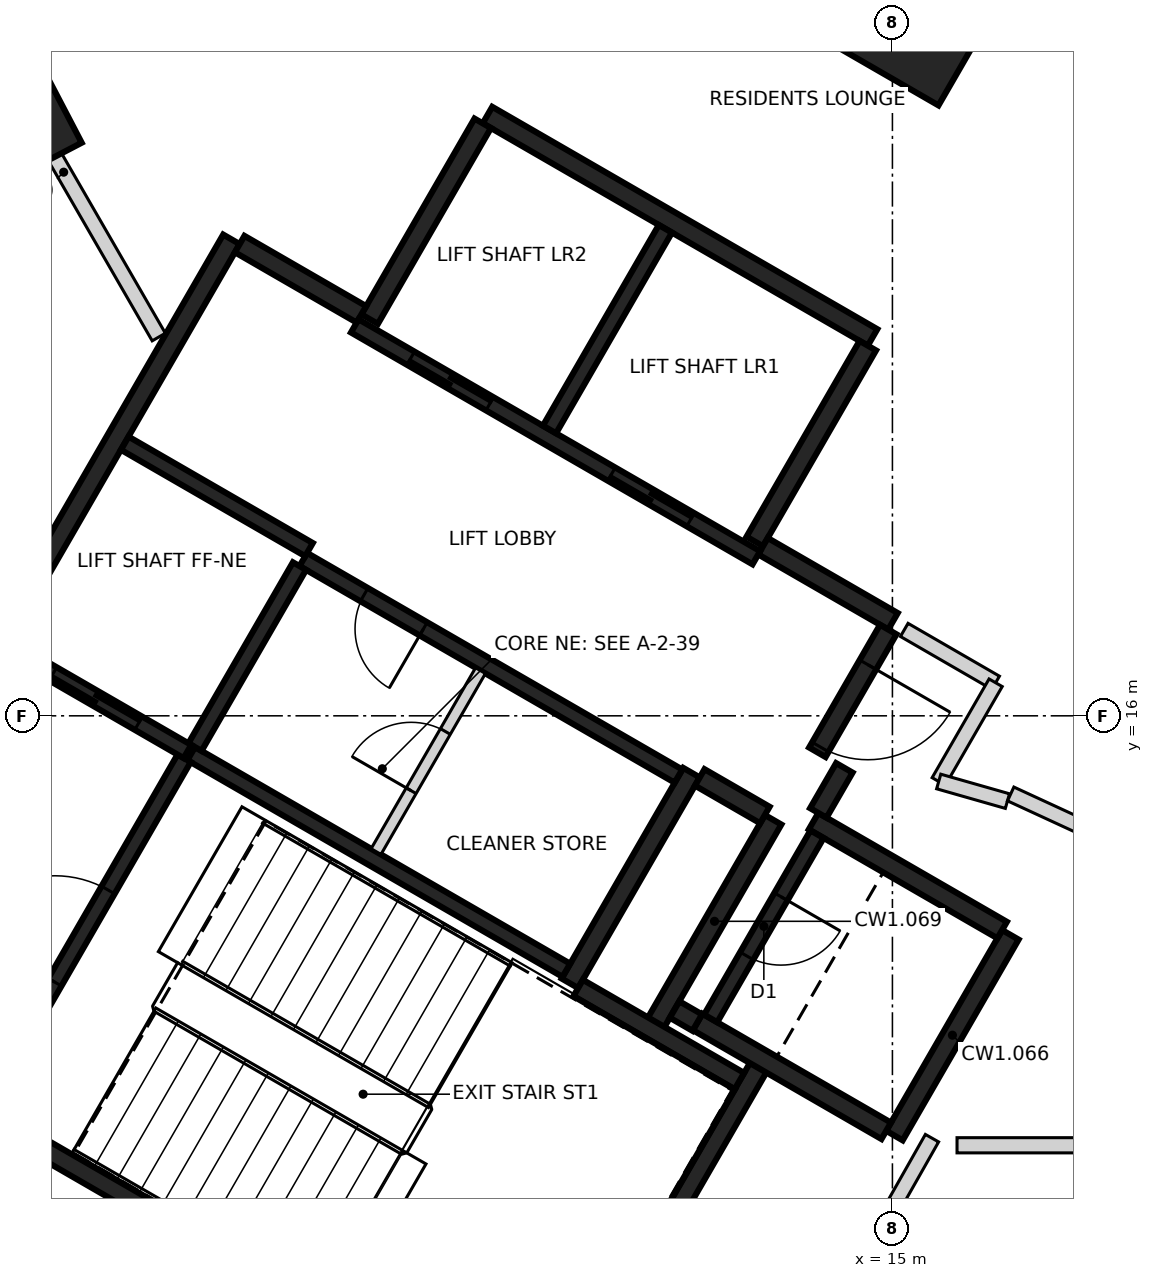
"""IFC4 building model, lengths in metres.
Left out: names, types, materials, properties, quantities, classifications, styles, units other than length and angle.
Written with IfcOpenShell. Run it as: python <this file> out.ifc"""

import sys

from ifc_helpers import new_model, si_unit, direction, frame, frame_2d, origin, origin_2d, place, context, subcontext, project, spatial, rectangle, extrude, element, fill, save


model = new_model("IFC4")
c1 = context("Model", 3, precision=1e-05, world=origin(), true_north=direction((0.0, 1.0)))
c2 = subcontext(c1, "Body", "Model", "MODEL_VIEW")
j1 = project(units=[si_unit("LENGTHUNIT", "METRE"), si_unit("PLANEANGLEUNIT", "RADIAN")], contexts=[c1])
p1 = place(None, origin())
s1 = spatial("IfcSite", under=j1, at=p1, CompositionType="ELEMENT")
p2 = place(p1, origin())
s2 = spatial("IfcBuilding", under=s1, at=p2, CompositionType="ELEMENT")
p3 = place(p2, frame((0.0, 0.0, 128.8)))
s3 = spatial("IfcBuildingStorey", under=s2, at=p3, CompositionType="ELEMENT", Elevation=128.8)
p4 = place(p3, frame((3.667, 23.896, -0.4), z_axis=(0.0, 0.0, 1.0), x_axis=(-0.463006774365, 0.886354740999, 0.0)))
e1 = element("IfcColumn", 1, at=p4, inside=s3, PredefinedType="COLUMN", context=c2, shape_type="SweptSolid", body=[
    extrude(rectangle(XDim=1.25, YDim=0.85, at=origin_2d()), origin(), (0.0, 0.0, 1.0), 3.6),
])
p5 = place(p3, frame((15.207, 26.34, -0.4), z_axis=(0.0, 0.0, 1.0), x_axis=(0.5, 0.866025403784, 0.0)))
e2 = element("IfcColumn", 2, at=p5, inside=s3, PredefinedType="COLUMN", context=c2, shape_type="SweptSolid", body=[
    extrude(rectangle(XDim=3.6, YDim=3.0, at=origin_2d()), origin(), (0.0, 0.0, 1.0), 3.6),
])
p6 = place(p3, frame((10.42, 6.498, 0.0), z_axis=(0.0, 0.0, 1.0), x_axis=(-0.866021906294, 0.500006057782, 0.0)))
e3 = element("IfcWall", 3, at=p6, inside=s3, PredefinedType="SHEAR", context=c2, shape_type="SweptSolid", body=[
    extrude(rectangle(XDim=11.55, YDim=0.25, at=frame_2d((5.775, 0.0))), origin(), (0.0, 0.0, 1.0), 3.2),
])
p7 = place(p6, frame((10.025, 0.0, 0.0)))
e4 = element("IfcOpeningElement", 4, at=p7, cuts=e3, PredefinedType="OPENING", context=c2, shape_type="SweptSolid", body=[
    extrude(rectangle(XDim=1.2, YDim=2.1, at=frame_2d((0.6, 1.05))), frame((0.0, 0.135, 0.0), z_axis=(0.0, -1.0, 0.0), x_axis=(1.0, 0.0, 0.0)), (0.0, 0.0, 1.0), 0.27),
])
p8 = place(p6, frame((8.725, 0.0, 0.0)))
e5 = element("IfcOpeningElement", 5, at=p8, cuts=e3, PredefinedType="OPENING", context=c2, shape_type="SweptSolid", body=[
    extrude(rectangle(XDim=1.2, YDim=2.1, at=frame_2d((0.6, 1.05))), frame((0.0, 0.135, 0.0), z_axis=(0.0, -1.0, 0.0), x_axis=(1.0, 0.0, 0.0)), (0.0, 0.0, 1.0), 0.27),
])
p9 = place(p3, frame((3.179, 16.856, 0.0), z_axis=(0.0, 0.0, 1.0), x_axis=(0.500004234368, 0.866022959057, 0.0)))
e6 = element("IfcWall", 6, at=p9, inside=s3, PredefinedType="SHEAR", context=c2, shape_type="SweptSolid", body=[
    extrude(rectangle(XDim=6.25, YDim=0.25, at=frame_2d((3.125, 0.0))), origin(), (0.0, 0.0, 1.0), 3.2),
])
p10 = place(p3, frame((9.673, 23.903, 0.0), z_axis=(0.0, 0.0, 1.0), x_axis=(0.86603616409, -0.499981362141, 0.0)))
e7 = element("IfcWall", 7, at=p10, inside=s3, PredefinedType="SHEAR", context=c2, shape_type="SweptSolid", body=[
    extrude(rectangle(XDim=5.85, YDim=0.25, at=frame_2d((2.925, 0.0))), origin(), (0.0, 0.0, 1.0), 3.2),
])
p11 = place(p3, frame((13.238, 11.378, 0.0), z_axis=(0.0, 0.0, 1.0), x_axis=(-0.500008851346, -0.866020293397, 0.0)))
e8 = element("IfcWall", 8, at=p11, inside=s3, PredefinedType="SHEAR", context=c2, shape_type="SweptSolid", body=[
    extrude(rectangle(XDim=5.51, YDim=0.25, at=frame_2d((2.755, 0.0))), origin(), (0.0, 0.0, 1.0), 3.2),
])
p12 = place(p3, frame((12.357, 15.252, 0.0), z_axis=(0.0, 0.0, 1.0), x_axis=(-0.500028443584, -0.866008981251, 0.0)))
e9 = element("IfcWall", 9, at=p12, inside=s3, PredefinedType="SHEAR", context=c2, shape_type="SweptSolid", body=[
    extrude(rectangle(XDim=3.2, YDim=0.25, at=frame_2d((1.6, 0.0))), origin(), (0.0, 0.0, 1.0), 3.2),
])
for number, where, z_axis, x_axis in (
    (10, (8.123, 21.219, 0.0), (0.0, 0.0, 1.0), (0.5, 0.866, 0.0)),
    (11, (14.676, 20.87, 0.0), (0.0, 0.0, 1.0), (-0.5, -0.866, 0.0)),
):
    element("IfcWall", number, at=place(p3, frame(where, z_axis=z_axis, x_axis=x_axis)), inside=s3, PredefinedType="SHEAR", context=c2, shape_type="SweptSolid", body=[
        extrude(rectangle(XDim=2.975, YDim=0.25, at=frame_2d((1.487, 0.0))), origin(), (0.0, 0.0, 1.0), 3.2),
    ])
p13 = place(p3, frame((16.552, 13.119, 0.0), z_axis=(0.0, 0.0, 1.0), x_axis=(-0.499978833458, -0.866037623948, 0.0)))
e12 = element("IfcWall", 12, at=p13, inside=s3, PredefinedType="SHEAR", context=c2, shape_type="SweptSolid", body=[
    extrude(rectangle(XDim=3.05, YDim=0.25, at=frame_2d((1.525, 0.0))), origin(), (0.0, 0.0, 1.0), 3.2),
])
p14 = place(p3, frame((14.918, 10.54, 0.0), z_axis=(0.0, 0.0, 1.0), x_axis=(-0.866063538972, 0.499933942099, 0.0)))
e13 = element("IfcWall", 13, at=p14, inside=s3, PredefinedType="SHEAR", context=c2, shape_type="SweptSolid", body=[
    extrude(rectangle(XDim=2.865, YDim=0.25, at=frame_2d((1.432, 0.0))), origin(), (0.0, 0.0, 1.0), 3.2),
])
p15 = place(p3, frame((13.963, 14.614, 0.0), z_axis=(0.0, 0.0, 1.0), x_axis=(0.866042235819, -0.499970844928, 0.0)))
e14 = element("IfcWall", 14, at=p15, inside=s3, PredefinedType="SHEAR", context=c2, shape_type="SweptSolid", body=[
    extrude(rectangle(XDim=2.865, YDim=0.25, at=frame_2d((1.432, 0.0))), origin(), (0.0, 0.0, 1.0), 3.2),
])
p16 = place(p3, frame((11.888, 11.961, 0.0), z_axis=(0.0, 0.0, 1.0), x_axis=(0.500003324108, 0.866023484601, 0.0)))
e15 = element("IfcWall", 15, at=p16, inside=s3, PredefinedType="SHEAR", context=c2, shape_type="SweptSolid", body=[
    extrude(rectangle(XDim=3.085, YDim=0.25, at=frame_2d((1.542, 0.0))), origin(), (0.0, 0.0, 1.0), 3.2),
])
p17 = place(p3, frame((10.865, 12.418, 0.0), z_axis=(0.0, 0.0, 1.0), x_axis=(0.866026229868, -0.499998569178, 0.0)))
e16 = element("IfcWall", 16, at=p17, inside=s3, PredefinedType="SHEAR", context=c2, shape_type="SweptSolid", body=[
    extrude(rectangle(XDim=2.449, YDim=0.25, at=frame_2d((1.225, 0.0))), origin(), (0.0, 0.0, 1.0), 3.2),
])
p18 = place(p3, frame((13.297, 18.231, 0.0), z_axis=(0.0, 0.0, 1.0), x_axis=(0.866043531843, -0.499968599967, 0.0)))
e17 = element("IfcWall", 17, at=p18, inside=s3, PredefinedType="SHEAR", context=c2, shape_type="SweptSolid", body=[
    extrude(rectangle(XDim=1.975, YDim=0.25, at=frame_2d((0.987, 0.0))), origin(), (0.0, 0.0, 1.0), 3.2),
])
p19 = place(p3, frame((6.413, 22.206, 0.0), z_axis=(0.0, 0.0, 1.0), x_axis=(0.866016279763, -0.500015802937, 0.0)))
e18 = element("IfcWall", 18, at=p19, inside=s3, PredefinedType="SHEAR", context=c2, shape_type="SweptSolid", body=[
    extrude(rectangle(XDim=1.849, YDim=0.25, at=frame_2d((0.925, 0.0))), origin(), (0.0, 0.0, 1.0), 3.2),
])
p20 = place(p3, frame((14.945, 17.135, 0.0), z_axis=(0.0, 0.0, 1.0), x_axis=(-0.499983108224, -0.866035156036, 0.0)))
e19 = element("IfcWall", 19, at=p20, inside=s3, PredefinedType="SHEAR", context=c2, shape_type="SweptSolid", body=[
    extrude(rectangle(XDim=1.865, YDim=0.25, at=frame_2d((0.932, 0.0))), origin(), (0.0, 0.0, 1.0), 3.2),
])
p21 = place(p20, frame((0.535, 0.0, 0.0)))
e20 = element("IfcOpeningElement", 20, at=p21, cuts=e19, PredefinedType="OPENING", context=c2, shape_type="SweptSolid", body=[
    extrude(rectangle(XDim=1.25, YDim=2.1, at=frame_2d((0.625, 1.05))), frame((0.0, 0.135, 0.0), z_axis=(0.0, -1.0, 0.0), x_axis=(1.0, 0.0, 0.0)), (0.0, 0.0, 1.0), 0.27),
])
p22 = place(p3, frame((13.322, 14.695, 0.0), z_axis=(0.0, 0.0, 1.0), x_axis=(-0.866017078145, 0.500014420154, 0.0)))
e21 = element("IfcWall", 21, at=p22, inside=s3, PredefinedType="SHEAR", context=c2, shape_type="SweptSolid", body=[
    extrude(rectangle(XDim=0.989, YDim=0.25, at=frame_2d((0.495, 0.0))), origin(), (0.0, 0.0, 1.0), 3.2),
])
p23 = place(p3, frame((14.368, 15.315, 0.0), z_axis=(0.0, 0.0, 1.0), x_axis=(-0.499897359611, -0.866084655132, 0.0)))
e22 = element("IfcWall", 22, at=p23, inside=s3, PredefinedType="SHEAR", context=c2, shape_type="SweptSolid", body=[
    extrude(rectangle(XDim=0.685, YDim=0.25, at=frame_2d((0.342, 0.0))), origin(), (0.0, 0.0, 1.0), 3.2),
])
p24 = place(p3, frame((12.433, 11.964, 0.0), z_axis=(0.0, 0.0, 1.0), x_axis=(-0.866055875208, 0.499947218231, 0.0)))
e23 = element("IfcWall", 23, at=p24, inside=s3, PredefinedType="SHEAR", context=c2, shape_type="SweptSolid", body=[
    extrude(rectangle(XDim=0.345, YDim=0.25, at=frame_2d((0.172, 0.0))), origin(), (0.0, 0.0, 1.0), 3.2),
])
p25 = place(p3, frame((13.21, 18.08, 0.0), z_axis=(0.0, 0.0, 1.0), x_axis=(-0.866030299012, 0.499991521122, 0.0)))
e24 = element("IfcWall", 24, at=p25, inside=s3, PredefinedType="SHEAR", context=c2, shape_type="SweptSolid", body=[
    extrude(rectangle(XDim=6.1, YDim=0.2, at=frame_2d((3.05, 0.0))), origin(), (0.0, 0.0, 1.0), 3.2),
])
p26 = place(p25, frame((1.0, 0.0, 0.0)))
e25 = element("IfcOpeningElement", 25, at=p26, cuts=e24, PredefinedType="OPENING", context=c2, shape_type="SweptSolid", body=[
    extrude(rectangle(XDim=1.2, YDim=2.1, at=frame_2d((0.6, 1.05))), frame((0.0, 0.11, 0.0), z_axis=(0.0, -1.0, 0.0), x_axis=(1.0, 0.0, 0.0)), (0.0, 0.0, 1.0), 0.22),
])
p27 = place(p25, frame((4.05, 0.0, 0.0)))
e26 = element("IfcOpeningElement", 26, at=p27, cuts=e24, PredefinedType="OPENING", context=c2, shape_type="SweptSolid", body=[
    extrude(rectangle(XDim=1.2, YDim=2.1, at=frame_2d((0.6, 1.05))), frame((0.0, 0.11, 0.0), z_axis=(0.0, -1.0, 0.0), x_axis=(1.0, 0.0, 0.0)), (0.0, 0.0, 1.0), 0.22),
])
p28 = place(p3, frame((5.775, 15.502, 0.0), z_axis=(0.0, 0.0, 1.0), x_axis=(0.866020080793, -0.500009219579, 0.0)))
e27 = element("IfcWall", 27, at=p28, inside=s3, PredefinedType="SHEAR", context=c2, shape_type="SweptSolid", body=[
    extrude(rectangle(XDim=5.699, YDim=0.2, at=frame_2d((2.85, 0.0))), origin(), (0.0, 0.0, 1.0), 3.2),
])
p29 = place(p3, frame((12.185, 15.207, 0.0), z_axis=(0.0, 0.0, 1.0), x_axis=(-0.866020080793, 0.500009219579, 0.0)))
e28 = element("IfcWall", 28, at=p29, inside=s3, PredefinedType="SHEAR", context=c2, shape_type="SweptSolid", body=[
    extrude(rectangle(XDim=5.699, YDim=0.2, at=frame_2d((2.85, 0.0))), origin(), (0.0, 0.0, 1.0), 3.2),
])
p30 = place(p29, frame((3.874, 0.0, 0.0)))
e29 = element("IfcOpeningElement", 29, at=p30, cuts=e28, PredefinedType="OPENING", context=c2, shape_type="SweptSolid", body=[
    extrude(rectangle(XDim=0.9, YDim=2.1, at=frame_2d((0.45, 1.05))), frame((0.0, 0.11, 0.0), z_axis=(0.0, -1.0, 0.0), x_axis=(1.0, 0.0, 0.0)), (0.0, 0.0, 1.0), 0.22),
])
p31 = place(p3, frame((3.057, 10.895, 0.0), z_axis=(0.0, 0.0, 1.0), x_axis=(0.499989418164, 0.866031513124, 0.0)))
e30 = element("IfcWall", 30, at=p31, inside=s3, PredefinedType="SHEAR", context=c2, shape_type="SweptSolid", body=[
    extrude(rectangle(XDim=5.251, YDim=0.2, at=frame_2d((2.625, 0.0))), origin(), (0.0, 0.0, 1.0), 3.2),
])
p32 = place(p31, frame((1.849, 0.0, 0.0)))
e31 = element("IfcOpeningElement", 31, at=p32, cuts=e30, PredefinedType="OPENING", context=c2, shape_type="SweptSolid", body=[
    extrude(rectangle(XDim=1.4, YDim=2.1, at=frame_2d((0.7, 1.05))), frame((0.0, 0.11, 0.0), z_axis=(0.0, -1.0, 0.0), x_axis=(1.0, 0.0, 0.0)), (0.0, 0.0, 1.0), 0.22),
])
p33 = place(p3, frame((10.489, 19.767, 0.0), z_axis=(0.0, 0.0, 1.0), x_axis=(0.499946628782, 0.866056215479, 0.0)))
e32 = element("IfcWall", 32, at=p33, inside=s3, PredefinedType="SHEAR", context=c2, shape_type="SweptSolid", body=[
    extrude(rectangle(XDim=3.048, YDim=0.2, at=frame_2d((1.524, 0.0))), origin(), (0.0, 0.0, 1.0), 3.2),
])
p34 = place(p3, frame((14.008, 14.442, 0.0), z_axis=(0.0, 0.0, 1.0), x_axis=(-0.499986818241, -0.866033014143, 0.0)))
e33 = element("IfcWall", 33, at=p34, inside=s3, PredefinedType="SHEAR", context=c2, shape_type="SweptSolid", body=[
    extrude(rectangle(XDim=2.798, YDim=0.2, at=frame_2d((1.399, 0.0))), origin(), (0.0, 0.0, 1.0), 3.2),
])
p35 = place(p34, frame((0.949, 0.0, 0.0)))
e34 = element("IfcOpeningElement", 34, at=p35, cuts=e33, PredefinedType="OPENING", context=c2, shape_type="SweptSolid", body=[
    extrude(rectangle(XDim=0.9, YDim=2.1, at=frame_2d((0.45, 1.05))), frame((0.0, 0.11, 0.0), z_axis=(0.0, -1.0, 0.0), x_axis=(1.0, 0.0, 0.0)), (0.0, 0.0, 1.0), 0.22),
])
p36 = place(p3, frame((7.199, 17.97, 0.0), z_axis=(0.0, 0.0, 1.0), x_axis=(-0.499968400327, -0.866043647095, 0.0)))
e35 = element("IfcWall", 35, at=p36, inside=s3, PredefinedType="SHEAR", context=c2, shape_type="SweptSolid", body=[
    extrude(rectangle(XDim=2.75, YDim=0.2, at=frame_2d((1.375, 0.0))), origin(), (0.0, 0.0, 1.0), 3.2),
])
p37 = place(p3, frame((5.725, 15.531, 0.0), z_axis=(0.0, 0.0, 1.0), x_axis=(-0.866037306777, 0.499979382845, 0.0)))
e36 = element("IfcWall", 36, at=p37, inside=s3, PredefinedType="SHEAR", context=c2, shape_type="SweptSolid", body=[
    extrude(rectangle(XDim=2.742, YDim=0.2, at=frame_2d((1.371, 0.0))), origin(), (0.0, 0.0, 1.0), 3.2),
])
p38 = place(p37, frame((0.743, 0.0, 0.0)))
e37 = element("IfcOpeningElement", 37, at=p38, cuts=e36, PredefinedType="OPENING", context=c2, shape_type="SweptSolid", body=[
    extrude(rectangle(XDim=1.3, YDim=2.1, at=frame_2d((0.65, 1.05))), frame((0.0, 0.11, 0.0), z_axis=(0.0, -1.0, 0.0), x_axis=(1.0, 0.0, 0.0)), (0.0, 0.0, 1.0), 0.22),
])
p39 = place(p3, frame((4.901, 19.586, 0.0), z_axis=(0.0, 0.0, 1.0), x_axis=(0.866022890907, -0.500004352405, 0.0)))
e38 = element("IfcWall", 38, at=p39, inside=s3, PredefinedType="SHEAR", context=c2, shape_type="SweptSolid", body=[
    extrude(rectangle(XDim=2.799, YDim=0.2, at=frame_2d((1.399, 0.0))), origin(), (0.0, 0.0, 1.0), 3.2),
])
p40 = place(p3, frame((8.207, 14.214, 0.0), z_axis=(0.0, 0.0, 1.0), x_axis=(0.499922376475, 0.866070215109, 0.0)))
e39 = element("IfcWall", 39, at=p40, inside=s3, PredefinedType="PARTITIONING", context=c2, shape_type="SweptSolid", body=[
    extrude(rectangle(XDim=2.749, YDim=0.15, at=frame_2d((1.374, 0.0))), origin(), (0.0, 0.0, 1.0), 3.2),
])
p41 = place(p40, frame((0.924, 0.0, 0.0)))
e40 = element("IfcOpeningElement", 40, at=p41, cuts=e39, PredefinedType="OPENING", context=c2, shape_type="SweptSolid", body=[
    extrude(rectangle(XDim=0.9, YDim=2.1, at=frame_2d((0.45, 1.05))), frame((0.0, 0.085, 0.0), z_axis=(0.0, -1.0, 0.0), x_axis=(1.0, 0.0, 0.0)), (0.0, 0.0, 1.0), 0.17),
])
p42 = place(p3, frame((14.066, 7.876, 0.0), z_axis=(0.0, 0.0, 1.0), x_axis=(0.492812174249, 0.870135714077, 0.0)))
e41 = element("IfcWall", 41, at=p42, inside=s3, PredefinedType="PARTITIONING", context=c2, shape_type="SweptSolid", body=[
    extrude(rectangle(XDim=2.951, YDim=0.2, at=frame_2d((1.476, 0.0))), origin(), (0.0, 0.0, 1.0), 3.2),
])
p43 = place(p3, frame((15.156, 17.13, 0.0), z_axis=(0.0, 0.0, 1.0), x_axis=(0.865755062894, -0.500467952093, 0.0)))
e42 = element("IfcWall", 42, at=p43, inside=s3, PredefinedType="PARTITIONING", context=c2, shape_type="SweptSolid", body=[
    extrude(rectangle(XDim=1.389, YDim=0.2, at=frame_2d((0.694, 0.0))), origin(), (0.0, 0.0, 1.0), 3.2),
])
p44 = place(p3, frame((15.609, 15.136, 0.0), z_axis=(0.0, 0.0, 1.0), x_axis=(0.499501622561, 0.866312950993, 0.0)))
e43 = element("IfcWall", 43, at=p44, inside=s3, PredefinedType="PARTITIONING", context=c2, shape_type="SweptSolid", body=[
    extrude(rectangle(XDim=1.5, YDim=0.2, at=frame_2d((0.75, 0.0))), origin(), (0.0, 0.0, 1.0), 3.2),
])
p45 = place(p3, frame((15.609, 15.136, 0.0), z_axis=(0.0, 0.0, 1.0), x_axis=(0.961592512205, -0.274481038455, 0.0)))
e44 = element("IfcWall", 44, at=p45, inside=s3, PredefinedType="PARTITIONING", context=c2, shape_type="SweptSolid", body=[
    extrude(rectangle(XDim=0.94, YDim=0.2, at=frame_2d((0.47, 0.0))), origin(), (0.0, 0.0, 1.0), 3.2),
])
p46 = place(p3, frame((15.85, 10.35, 0.0), z_axis=(0.0, 0.0, 1.0), x_axis=(1.0, 0.0, 0.0)))
e45 = element("IfcWall", 45, at=p46, inside=s3, PredefinedType="PARTITIONING", context=c2, shape_type="SweptSolid", body=[
    extrude(rectangle(XDim=2.5, YDim=0.2, at=frame_2d((1.25, 0.0))), origin(), (0.0, 0.0, 1.0), 3.2),
])
p47 = place(p3, frame((16.556, 14.972, 0.0), z_axis=(0.0, 0.0, 1.0), x_axis=(0.907999158806, -0.418971989048, 0.0)))
e46 = element("IfcWall", 46, at=p47, inside=s3, PredefinedType="PARTITIONING", context=c2, shape_type="SweptSolid", body=[
    extrude(rectangle(XDim=1.976, YDim=0.2, at=frame_2d((0.988, 0.0))), origin(), (0.0, 0.0, 1.0), 3.2),
])
p48 = place(p3, frame((2.845, 25.321, 0.0), z_axis=(0.0, 0.0, 1.0), x_axis=(0.499730893997, -0.86618071647, 0.0)))
e47 = element("IfcWall", 47, at=p48, inside=s3, PredefinedType="PARTITIONING", context=c2, shape_type="SweptSolid", body=[
    extrude(rectangle(XDim=5.008, YDim=0.2, at=frame_2d((2.504, 0.0))), origin(), (0.0, 0.0, 1.0), 3.2),
])
p49 = place(p38, origin())
e48 = element("IfcDoor", 48, at=p49, inside=s3, OperationType="SLIDING_TO_LEFT", PredefinedType="DOOR", context=c2, shape_type="SweptSolid", body=[
    extrude(rectangle(XDim=1.3, YDim=2.1, at=frame_2d((0.65, 1.05))), frame((0.0, 0.025, 0.0), z_axis=(0.0, -1.0, 0.0), x_axis=(1.0, 0.0, 0.0)), (0.0, 0.0, 1.0), 0.05),
])
fill(e37, e48)
p50 = place(p26, origin())
e49 = element("IfcDoor", 49, at=p50, inside=s3, OperationType="DOUBLE_DOOR_SLIDING", PredefinedType="DOOR", context=c2, shape_type="SweptSolid", body=[
    extrude(rectangle(XDim=1.2, YDim=2.1, at=frame_2d((0.6, 1.05))), frame((0.0, 0.025, 0.0), z_axis=(0.0, -1.0, 0.0), x_axis=(1.0, 0.0, 0.0)), (0.0, 0.0, 1.0), 0.05),
])
fill(e25, e49)
p51 = place(p27, origin())
e50 = element("IfcDoor", 50, at=p51, inside=s3, OperationType="DOUBLE_DOOR_SLIDING", PredefinedType="DOOR", context=c2, shape_type="SweptSolid", body=[
    extrude(rectangle(XDim=1.2, YDim=2.1, at=frame_2d((0.6, 1.05))), frame((0.0, 0.025, 0.0), z_axis=(0.0, -1.0, 0.0), x_axis=(1.0, 0.0, 0.0)), (0.0, 0.0, 1.0), 0.05),
])
fill(e26, e50)
p52 = place(p21, origin())
e51 = element("IfcDoor", 51, at=p52, inside=s3, OperationType="SINGLE_SWING_LEFT", PredefinedType="DOOR", context=c2, shape_type="SweptSolid", body=[
    extrude(rectangle(XDim=1.25, YDim=2.1, at=frame_2d((0.625, 1.05))), frame((0.0, 0.025, 0.0), z_axis=(0.0, -1.0, 0.0), x_axis=(1.0, 0.0, 0.0)), (0.0, 0.0, 1.0), 0.05),
])
fill(e20, e51)
p53 = place(p32, origin())
e52 = element("IfcDoor", 52, at=p53, inside=s3, OperationType="SINGLE_SWING_LEFT", PredefinedType="DOOR", context=c2, shape_type="SweptSolid", body=[
    extrude(rectangle(XDim=1.4, YDim=2.1, at=frame_2d((0.7, 1.05))), frame((0.0, 0.025, 0.0), z_axis=(0.0, -1.0, 0.0), x_axis=(1.0, 0.0, 0.0)), (0.0, 0.0, 1.0), 0.05),
])
fill(e31, e52)
p54 = place(p30, origin())
e53 = element("IfcDoor", 53, at=p54, inside=s3, OperationType="SINGLE_SWING_RIGHT", PredefinedType="DOOR", context=c2, shape_type="SweptSolid", body=[
    extrude(rectangle(XDim=0.9, YDim=2.1, at=frame_2d((0.45, 1.05))), frame((0.0, 0.025, 0.0), z_axis=(0.0, -1.0, 0.0), x_axis=(1.0, 0.0, 0.0)), (0.0, 0.0, 1.0), 0.05),
])
fill(e29, e53)
p55 = place(p35, origin())
e54 = element("IfcDoor", 54, at=p55, inside=s3, OperationType="SINGLE_SWING_LEFT", PredefinedType="DOOR", context=c2, shape_type="SweptSolid", body=[
    extrude(rectangle(XDim=0.9, YDim=2.1, at=frame_2d((0.45, 1.05))), frame((0.0, 0.025, 0.0), z_axis=(0.0, -1.0, 0.0), x_axis=(1.0, 0.0, 0.0)), (0.0, 0.0, 1.0), 0.05),
])
fill(e34, e54)
p56 = place(p41, origin())
e55 = element("IfcDoor", 55, at=p56, inside=s3, OperationType="SINGLE_SWING_RIGHT", PredefinedType="DOOR", context=c2, shape_type="SweptSolid", body=[
    extrude(rectangle(XDim=0.9, YDim=2.1, at=frame_2d((0.45, 1.05))), frame((0.0, 0.025, 0.0), z_axis=(0.0, -1.0, 0.0), x_axis=(1.0, 0.0, 0.0)), (0.0, 0.0, 1.0), 0.05),
])
fill(e40, e55)
save(model, sys.argv[1])
